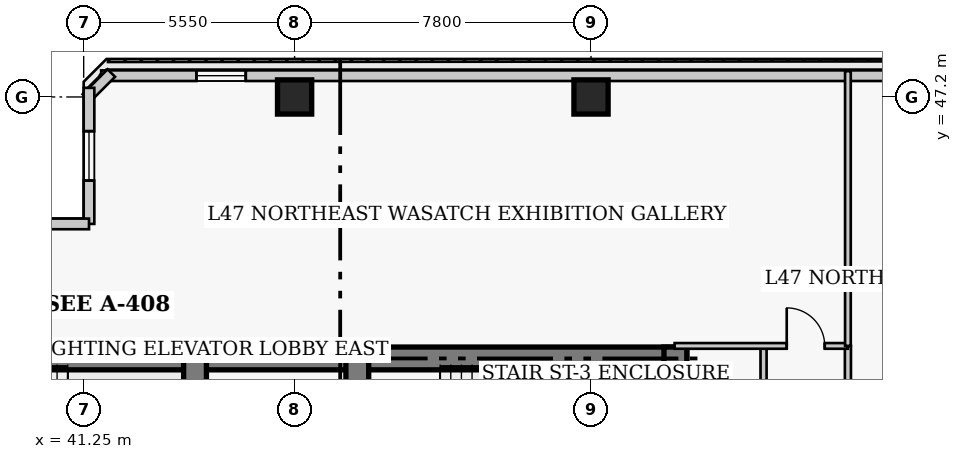
"""IFC4 building model, lengths in metres.
Left out: names, types, materials, properties, quantities, classifications, styles, units other than length and angle.
Written with IfcOpenShell. Run it as: python <this file> out.ifc"""

import sys

from ifc_helpers import new_model, si_unit, direction, frame, frame_2d, origin, origin_2d, place, context, subcontext, project, spatial, rectangle, extrude, element, fill, save


model = new_model("IFC4")
c1 = context("Model", 3, precision=1e-05, world=origin(), true_north=direction((0.0, 1.0)))
c2 = subcontext(c1, "Body", "Model", "MODEL_VIEW")
j1 = project(units=[si_unit("LENGTHUNIT", "METRE"), si_unit("PLANEANGLEUNIT", "RADIAN")], contexts=[c1])
p1 = place(None, origin())
s1 = spatial("IfcSite", under=j1, at=p1, CompositionType="ELEMENT")
p2 = place(p1, origin())
s2 = spatial("IfcBuilding", under=s1, at=p2, CompositionType="ELEMENT")
p3 = place(p2, frame((0.0, 0.0, 189.0)))
s3 = spatial("IfcBuildingStorey", under=s2, at=p3, CompositionType="ELEMENT", Elevation=189.0)
p4 = place(p3, frame((35.85, 40.32, 0.0), z_axis=(0.0, 0.0, 1.0), x_axis=(1.0, 0.0, 0.0)))
e1 = element("IfcWall", 1, at=p4, inside=s3, PredefinedType="SHEAR", context=c2, shape_type="SweptSolid", body=[
    extrude(rectangle(XDim=12.6, YDim=0.6, at=frame_2d((6.3, 0.0))), origin(), (0.0, 0.0, 1.0), 3.9),
])
p5 = place(p3, frame((48.45, 40.32, 0.0), z_axis=(0.0, 0.0, 1.0), x_axis=(1.0, 0.0, 0.0)))
e2 = element("IfcWall", 2, at=p5, inside=s3, PredefinedType="SHEAR", context=c2, shape_type="SweptSolid", body=[
    extrude(rectangle(XDim=8.67, YDim=0.6, at=frame_2d((4.335, 0.0))), origin(), (0.0, 0.0, 1.0), 3.9),
])
p6 = place(p3, frame((56.82, 27.05, 0.0), z_axis=(0.0, 0.0, 1.0), x_axis=(0.0, 1.0, 0.0)))
e3 = element("IfcWall", 3, at=p6, inside=s3, PredefinedType="SHEAR", context=c2, shape_type="SweptSolid", body=[
    extrude(rectangle(XDim=13.57, YDim=0.6, at=frame_2d((6.785, 0.0))), origin(), (0.0, 0.0, 1.0), 3.9),
])
p7 = place(p3, frame((44.18, 36.37, 0.0), z_axis=(0.0, 0.0, 1.0), x_axis=(0.0, 1.0, 0.0)))
e4 = element("IfcWall", 4, at=p7, inside=s3, PredefinedType="SHEAR", context=c2, shape_type="SweptSolid", body=[
    extrude(rectangle(XDim=3.95, YDim=0.6, at=frame_2d((1.975, 0.0))), origin(), (0.0, 0.0, 1.0), 3.9),
])
p8 = place(p3, frame((48.45, 32.45, 0.0), z_axis=(0.0, 0.0, 1.0), x_axis=(0.0, 1.0, 0.0)))
e5 = element("IfcWall", 5, at=p8, inside=s3, PredefinedType="SHEAR", context=c2, shape_type="SweptSolid", body=[
    extrude(rectangle(XDim=7.87, YDim=0.6, at=frame_2d((3.935, 0.0))), origin(), (0.0, 0.0, 1.0), 3.9),
])
p9 = place(p8, frame((5.75, 0.0, 0.0)))
e6 = element("IfcOpeningElement", 6, at=p9, cuts=e5, PredefinedType="OPENING", context=c2, shape_type="SweptSolid", body=[
    extrude(rectangle(XDim=1.1, YDim=2.15, at=frame_2d((0.55, 1.075))), frame((0.0, 0.31, 0.0), z_axis=(0.0, -1.0, 0.0), x_axis=(1.0, 0.0, 0.0)), (0.0, 0.0, 1.0), 0.62),
])
for number, where, z_axis, x_axis in (
    (7, (46.8, 47.2, 0.0), (0.0, 0.0, 1.0), (1.0, 0.0, 0.0)),
    (8, (54.6, 47.2, 0.0), (0.0, 0.0, 1.0), (1.0, 0.0, 0.0)),
):
    element("IfcColumn", number, at=place(p3, frame(where, z_axis=z_axis, x_axis=x_axis)), inside=s3, PredefinedType="COLUMN", context=c2, shape_type="SweptSolid", body=[
        extrude(rectangle(XDim=0.9, YDim=0.9, at=origin_2d()), origin(), (0.0, 0.0, 1.0), 3.9),
    ])
p10 = place(p3, frame((67.54, 47.76, 0.0), z_axis=(0.0, 0.0, 1.0), x_axis=(-1.0, 0.0, 0.0)))
e9 = element("IfcWall", 9, at=p10, inside=s3, PredefinedType="SOLIDWALL", context=c2, shape_type="SweptSolid", body=[
    extrude(rectangle(XDim=25.83, YDim=0.28, at=frame_2d((12.915, 0.0))), origin(), (0.0, 0.0, 1.0), 3.65),
])
p11 = place(p10, frame((3.655, 0.0, 0.85)))
e10 = element("IfcOpeningElement", 10, at=p11, cuts=e9, PredefinedType="OPENING", context=c2, shape_type="SweptSolid", body=[
    extrude(rectangle(XDim=1.3, YDim=1.7, at=frame_2d((0.65, 0.85))), frame((0.0, 0.15, 0.0), z_axis=(0.0, -1.0, 0.0), x_axis=(1.0, 0.0, 0.0)), (0.0, 0.0, 1.0), 0.3),
])
p12 = place(p10, frame((22.025, 0.0, 0.85)))
e11 = element("IfcOpeningElement", 11, at=p12, cuts=e9, PredefinedType="OPENING", context=c2, shape_type="SweptSolid", body=[
    extrude(rectangle(XDim=1.3, YDim=1.7, at=frame_2d((0.65, 0.85))), frame((0.0, 0.15, 0.0), z_axis=(0.0, -1.0, 0.0), x_axis=(1.0, 0.0, 0.0)), (0.0, 0.0, 1.0), 0.3),
])
p13 = place(p3, frame((41.977, 47.829, 0.0), z_axis=(0.0, 0.0, 1.0), x_axis=(-0.706975312048, -0.707238225886, 0.0)))
e12 = element("IfcWall", 12, at=p13, inside=s3, PredefinedType="SOLIDWALL", context=c2, shape_type="SweptSolid", body=[
    extrude(rectangle(XDim=0.929, YDim=0.28, at=frame_2d((0.464, 0.0))), origin(), (0.0, 0.0, 1.0), 3.65),
])
p14 = place(p3, frame((41.39, 47.44, 0.0), z_axis=(0.0, 0.0, 1.0), x_axis=(0.0, -1.0, 0.0)))
e13 = element("IfcWall", 13, at=p14, inside=s3, PredefinedType="SOLIDWALL", context=c2, shape_type="SweptSolid", body=[
    extrude(rectangle(XDim=3.58, YDim=0.28, at=frame_2d((1.79, 0.0))), origin(), (0.0, 0.0, 1.0), 3.65),
])
p15 = place(p14, frame((1.14, 0.0, 0.85)))
e14 = element("IfcOpeningElement", 14, at=p15, cuts=e13, PredefinedType="OPENING", context=c2, shape_type="SweptSolid", body=[
    extrude(rectangle(XDim=1.3, YDim=1.7, at=frame_2d((0.65, 0.85))), frame((0.0, 0.15, 0.0), z_axis=(0.0, -1.0, 0.0), x_axis=(1.0, 0.0, 0.0)), (0.0, 0.0, 1.0), 0.3),
])
p16 = place(p3, frame((41.39, 43.86, 0.0), z_axis=(0.0, 0.0, 1.0), x_axis=(-1.0, 0.0, 0.0)))
e15 = element("IfcWall", 15, at=p16, inside=s3, PredefinedType="SOLIDWALL", context=c2, shape_type="SweptSolid", body=[
    extrude(rectangle(XDim=4.78, YDim=0.28, at=frame_2d((2.39, 0.0))), origin(), (0.0, 0.0, 1.0), 3.65),
])
p17 = place(p16, frame((1.74, 0.0, 0.85)))
e16 = element("IfcOpeningElement", 16, at=p17, cuts=e15, PredefinedType="OPENING", context=c2, shape_type="SweptSolid", body=[
    extrude(rectangle(XDim=1.3, YDim=1.7, at=frame_2d((0.65, 0.85))), frame((0.0, 0.15, 0.0), z_axis=(0.0, -1.0, 0.0), x_axis=(1.0, 0.0, 0.0)), (0.0, 0.0, 1.0), 0.3),
])
p18 = place(p3, frame((61.36, 11.95, 0.0), z_axis=(0.0, 0.0, 1.0), x_axis=(0.0, 1.0, 0.0)))
e17 = element("IfcWall", 17, at=p18, inside=s3, PredefinedType="PARTITIONING", context=c2, shape_type="SweptSolid", body=[
    extrude(rectangle(XDim=28.7, YDim=0.16, at=frame_2d((14.35, 0.0))), origin(), (0.0, 0.0, 1.0), 3.65),
])
p19 = place(p18, frame((3.55, 0.0, 0.0)))
e18 = element("IfcOpeningElement", 18, at=p19, cuts=e17, PredefinedType="OPENING", context=c2, shape_type="SweptSolid", body=[
    extrude(rectangle(XDim=0.95, YDim=2.1, at=frame_2d((0.475, 1.05))), frame((0.0, 0.09, 0.0), z_axis=(0.0, -1.0, 0.0), x_axis=(1.0, 0.0, 0.0)), (0.0, 0.0, 1.0), 0.18),
])
p20 = place(p18, frame((11.975, 0.0, 0.0)))
e19 = element("IfcOpeningElement", 19, at=p20, cuts=e17, PredefinedType="OPENING", context=c2, shape_type="SweptSolid", body=[
    extrude(rectangle(XDim=0.95, YDim=2.1, at=frame_2d((0.475, 1.05))), frame((0.0, 0.09, 0.0), z_axis=(0.0, -1.0, 0.0), x_axis=(1.0, 0.0, 0.0)), (0.0, 0.0, 1.0), 0.18),
])
p21 = place(p18, frame((19.775, 0.0, 0.0)))
e20 = element("IfcOpeningElement", 20, at=p21, cuts=e17, PredefinedType="OPENING", context=c2, shape_type="SweptSolid", body=[
    extrude(rectangle(XDim=0.95, YDim=2.1, at=frame_2d((0.475, 1.05))), frame((0.0, 0.09, 0.0), z_axis=(0.0, -1.0, 0.0), x_axis=(1.0, 0.0, 0.0)), (0.0, 0.0, 1.0), 0.18),
])
p22 = place(p18, frame((24.2, 0.0, 0.0)))
e21 = element("IfcOpeningElement", 21, at=p22, cuts=e17, PredefinedType="OPENING", context=c2, shape_type="SweptSolid", body=[
    extrude(rectangle(XDim=1.0, YDim=2.15, at=frame_2d((0.5, 1.075))), frame((0.0, 0.09, 0.0), z_axis=(0.0, -1.0, 0.0), x_axis=(1.0, 0.0, 0.0)), (0.0, 0.0, 1.0), 0.18),
])
p23 = place(p3, frame((59.14, 17.26, 0.0), z_axis=(0.0, 0.0, 1.0), x_axis=(0.0, 1.0, 0.0)))
e22 = element("IfcWall", 22, at=p23, inside=s3, PredefinedType="PARTITIONING", context=c2, shape_type="SweptSolid", body=[
    extrude(rectangle(XDim=23.39, YDim=0.16, at=frame_2d((11.695, 0.0))), origin(), (0.0, 0.0, 1.0), 3.65),
])
p24 = place(p3, frame((56.8, 40.65, 0.0), z_axis=(0.0, 0.0, 1.0), x_axis=(1.0, 0.0, 0.0)))
e23 = element("IfcWall", 23, at=p24, inside=s3, PredefinedType="PARTITIONING", context=c2, shape_type="SweptSolid", body=[
    extrude(rectangle(XDim=4.56, YDim=0.15, at=frame_2d((2.28, 0.0))), origin(), (0.0, 0.0, 1.0), 3.65),
])
p25 = place(p24, frame((2.95, 0.0, 0.0)))
e24 = element("IfcOpeningElement", 24, at=p25, cuts=e23, PredefinedType="OPENING", context=c2, shape_type="SweptSolid", body=[
    extrude(rectangle(XDim=1.0, YDim=2.15, at=frame_2d((0.5, 1.075))), frame((0.0, 0.085, 0.0), z_axis=(0.0, -1.0, 0.0), x_axis=(1.0, 0.0, 0.0)), (0.0, 0.0, 1.0), 0.17),
])
p26 = place(p3, frame((61.36, 40.65, 0.0), z_axis=(0.0, 0.0, 1.0), x_axis=(0.0, 1.0, 0.0)))
e25 = element("IfcWall", 25, at=p26, inside=s3, PredefinedType="PARTITIONING", context=c2, shape_type="SweptSolid", body=[
    extrude(rectangle(XDim=7.23, YDim=0.15, at=frame_2d((3.615, 0.0))), origin(), (0.0, 0.0, 1.0), 3.65),
])
p27 = place(p12, origin())
e26 = element("IfcWindow", 26, at=p27, inside=s3, PartitioningType="SINGLE_PANEL", PredefinedType="WINDOW", context=c2, shape_type="SweptSolid", body=[
    extrude(rectangle(XDim=1.3, YDim=1.7, at=frame_2d((0.65, 0.85))), frame((0.0, 0.03, 0.0), z_axis=(0.0, -1.0, 0.0), x_axis=(1.0, 0.0, 0.0)), (0.0, 0.0, 1.0), 0.06),
])
fill(e11, e26)
p28 = place(p15, origin())
e27 = element("IfcWindow", 27, at=p28, inside=s3, PartitioningType="SINGLE_PANEL", PredefinedType="WINDOW", context=c2, shape_type="SweptSolid", body=[
    extrude(rectangle(XDim=1.3, YDim=1.7, at=frame_2d((0.65, 0.85))), frame((0.0, 0.03, 0.0), z_axis=(0.0, -1.0, 0.0), x_axis=(1.0, 0.0, 0.0)), (0.0, 0.0, 1.0), 0.06),
])
fill(e14, e27)
p29 = place(p25, origin())
e28 = element("IfcDoor", 28, at=p29, inside=s3, OperationType="SINGLE_SWING_LEFT", PredefinedType="DOOR", context=c2, shape_type="SweptSolid", body=[
    extrude(rectangle(XDim=1.0, YDim=2.15, at=frame_2d((0.5, 1.075))), frame((0.0, 0.025, 0.0), z_axis=(0.0, -1.0, 0.0), x_axis=(1.0, 0.0, 0.0)), (0.0, 0.0, 1.0), 0.05),
])
fill(e24, e28)
save(model, sys.argv[1])
